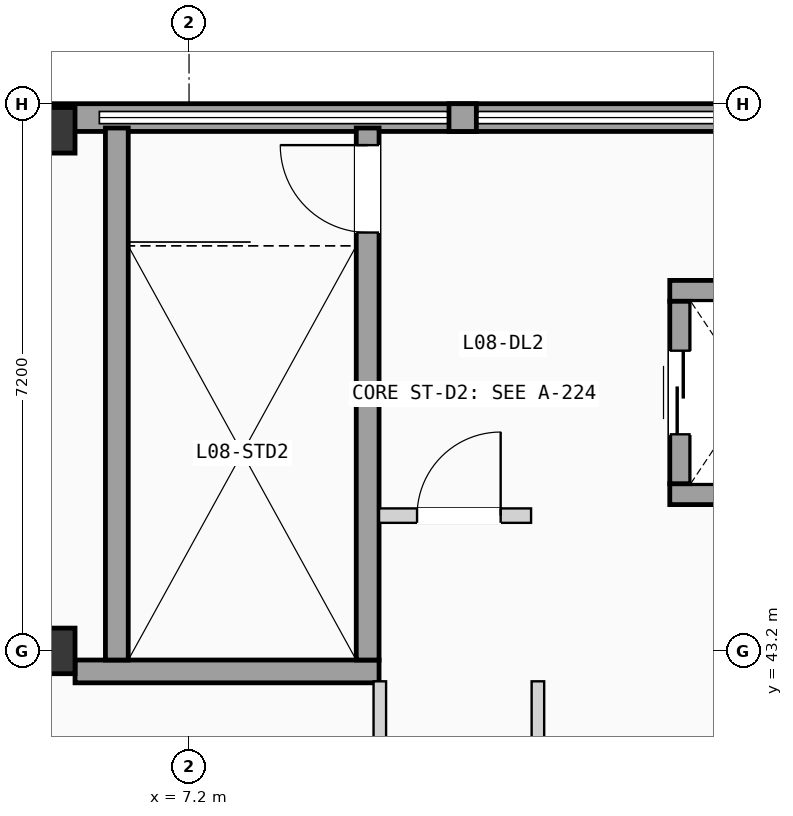
"""IFC4 building model, lengths in metres.
Left out: names, types, materials, properties, quantities, classifications, styles, units other than length and angle.
Written with IfcOpenShell. Run it as: python <this file> out.ifc"""

import sys

from ifc_helpers import new_model, si_unit, direction, frame, frame_2d, origin, origin_2d, place, context, subcontext, project, spatial, rectangle, extrude, element, fill, save


model = new_model("IFC4")
c1 = context("Model", 3, precision=1e-05, world=origin(), true_north=direction((0.0, 1.0)))
c2 = subcontext(c1, "Body", "Model", "MODEL_VIEW")
j1 = project(units=[si_unit("LENGTHUNIT", "METRE"), si_unit("PLANEANGLEUNIT", "RADIAN")], contexts=[c1])
p1 = place(None, origin())
s1 = spatial("IfcSite", under=j1, at=p1, CompositionType="ELEMENT")
p2 = place(p1, origin())
s2 = spatial("IfcBuilding", under=s1, at=p2, CompositionType="ELEMENT")
p3 = place(p2, frame((0.0, 0.0, 27.825)))
s3 = spatial("IfcBuildingStorey", under=s2, at=p3, CompositionType="ELEMENT", Elevation=27.825)
for number, where, z_axis, x_axis in (
    (1, (5.4, 43.2, 0.0), (0.0, 0.0, 1.0), (1.0, 0.0, 0.0)),
    (2, (5.4, 50.05, 0.0), (0.0, 0.0, 1.0), (1.0, 0.0, 0.0)),
):
    element("IfcColumn", number, at=place(p3, frame(where, z_axis=z_axis, x_axis=x_axis)), inside=s3, PredefinedType="COLUMN", context=c2, shape_type="SweptSolid", body=[
        extrude(rectangle(XDim=0.6, YDim=0.6, at=origin_2d()), origin(), (0.0, 0.0, 1.0), 2.85),
    ])
p4 = place(p3, frame((4.8, 50.218, 0.0), z_axis=(0.0, 0.0, 1.0), x_axis=(1.0, 0.0, 0.0)))
e3 = element("IfcWall", 3, at=p4, inside=s3, PredefinedType="SOLIDWALL", context=c2, shape_type="SweptSolid", body=[
    extrude(rectangle(XDim=12.0, YDim=0.365, at=frame_2d((6.0, 0.0))), origin(), (0.0, 0.0, 1.0), 1.11),
])
p5 = place(p3, frame((10.62, 50.218, 1.11), z_axis=(0.0, 0.0, 1.0), x_axis=(1.0, 0.0, 0.0)))
e4 = element("IfcWall", 4, at=p5, inside=s3, PredefinedType="SOLIDWALL", context=c2, shape_type="SweptSolid", body=[
    extrude(rectangle(XDim=0.36, YDim=0.365, at=frame_2d((0.18, 0.0))), origin(), (0.0, 0.0, 1.0), 1.44),
])
p6 = place(p3, frame((5.7, 42.93, 0.0), z_axis=(0.0, 0.0, 1.0), x_axis=(1.0, 0.0, 0.0)))
e5 = element("IfcWall", 5, at=p6, inside=s3, PredefinedType="SHEAR", context=c2, shape_type="SweptSolid", body=[
    extrude(rectangle(XDim=4.0, YDim=0.3, at=frame_2d((2.0, 0.0))), origin(), (0.0, 0.0, 1.0), 2.55),
])
p7 = place(p3, frame((6.25, 43.08, 0.0), z_axis=(0.0, 0.0, 1.0), x_axis=(0.0, 1.0, 0.0)))
e6 = element("IfcWall", 6, at=p7, inside=s3, PredefinedType="SHEAR", context=c2, shape_type="SweptSolid", body=[
    extrude(rectangle(XDim=7.0, YDim=0.3, at=frame_2d((3.5, 0.0))), origin(), (0.0, 0.0, 1.0), 2.55),
])
p8 = place(p3, frame((9.55, 43.08, 0.0), z_axis=(0.0, 0.0, 1.0), x_axis=(0.0, 1.0, 0.0)))
e7 = element("IfcWall", 7, at=p8, inside=s3, PredefinedType="SHEAR", context=c2, shape_type="SweptSolid", body=[
    extrude(rectangle(XDim=7.0, YDim=0.3, at=frame_2d((3.5, 0.0))), origin(), (0.0, 0.0, 1.0), 2.55),
])
p9 = place(p8, frame((5.625, 0.0, 0.0)))
e8 = element("IfcOpeningElement", 8, at=p9, cuts=e7, PredefinedType="OPENING", context=c2, shape_type="SweptSolid", body=[
    extrude(rectangle(XDim=1.15, YDim=2.12, at=frame_2d((0.575, 1.06))), frame((0.0, 0.16, 0.0), z_axis=(0.0, -1.0, 0.0), x_axis=(1.0, 0.0, 0.0)), (0.0, 0.0, 1.0), 0.32),
])
for number, where, z_axis, x_axis in (
    (9, (13.525, 45.262, 0.0), (0.0, 0.0, 1.0), (1.0, 0.0, 0.0)),
    (10, (13.525, 47.938, 0.0), (0.0, 0.0, 1.0), (1.0, 0.0, 0.0)),
):
    element("IfcWall", number, at=place(p3, frame(where, z_axis=z_axis, x_axis=x_axis)), inside=s3, PredefinedType="SHEAR", context=c2, shape_type="SweptSolid", body=[
        extrude(rectangle(XDim=2.15, YDim=0.275, at=frame_2d((1.075, 0.0))), origin(), (0.0, 0.0, 1.0), 2.55),
    ])
p10 = place(p3, frame((13.663, 45.4, 0.0), z_axis=(0.0, 0.0, 1.0), x_axis=(0.0, 1.0, 0.0)))
e11 = element("IfcWall", 11, at=p10, inside=s3, PredefinedType="SHEAR", context=c2, shape_type="SweptSolid", body=[
    extrude(rectangle(XDim=2.4, YDim=0.275, at=frame_2d((1.2, 0.0))), origin(), (0.0, 0.0, 1.0), 2.55),
])
p11 = place(p10, frame((0.65, 0.0, 0.0)))
e12 = element("IfcOpeningElement", 12, at=p11, cuts=e11, PredefinedType="OPENING", context=c2, shape_type="SweptSolid", body=[
    extrude(rectangle(XDim=1.1, YDim=2.15, at=frame_2d((0.55, 1.075))), frame((0.0, 0.147, 0.0), z_axis=(0.0, -1.0, 0.0), x_axis=(1.0, 0.0, 0.0)), (0.0, 0.0, 1.0), 0.295),
])
p12 = place(p3, frame((9.7, 44.98, 0.0), z_axis=(0.0, 0.0, 1.0), x_axis=(1.0, 0.0, 0.0)))
e13 = element("IfcWall", 13, at=p12, inside=s3, PredefinedType="PARTITIONING", context=c2, shape_type="SweptSolid", body=[
    extrude(rectangle(XDim=2.0, YDim=0.19, at=frame_2d((1.0, 0.0))), origin(), (0.0, 0.0, 1.0), 2.39),
])
p13 = place(p12, frame((0.5, 0.0, 0.0)))
e14 = element("IfcOpeningElement", 14, at=p13, cuts=e13, PredefinedType="OPENING", context=c2, shape_type="SweptSolid", body=[
    extrude(rectangle(XDim=1.1, YDim=2.12, at=frame_2d((0.55, 1.06))), frame((0.0, 0.105, 0.0), z_axis=(0.0, -1.0, 0.0), x_axis=(1.0, 0.0, 0.0)), (0.0, 0.0, 1.0), 0.21),
])
for number, where, z_axis, x_axis in (
    (15, (9.71, 39.03, 0.0), (0.0, 0.0, 1.0), (0.0, 1.0, 0.0)),
    (16, (11.79, 39.03, 0.0), (0.0, 0.0, 1.0), (0.0, 1.0, 0.0)),
):
    element("IfcWall", number, at=place(p3, frame(where, z_axis=z_axis, x_axis=x_axis)), inside=s3, PredefinedType="PARTITIONING", context=c2, shape_type="SweptSolid", body=[
        extrude(rectangle(XDim=3.77, YDim=0.165, at=frame_2d((1.885, 0.0))), origin(), (0.0, 0.0, 1.0), 2.39),
    ])
p14 = place(p9, origin())
e17 = element("IfcDoor", 17, at=p14, inside=s3, OperationType="SINGLE_SWING_RIGHT", PredefinedType="DOOR", context=c2, shape_type="SweptSolid", body=[
    extrude(rectangle(XDim=1.15, YDim=2.12, at=frame_2d((0.575, 1.06))), frame((0.0, 0.025, 0.0), z_axis=(0.0, -1.0, 0.0), x_axis=(1.0, 0.0, 0.0)), (0.0, 0.0, 1.0), 0.05),
])
fill(e8, e17)
p15 = place(p11, origin())
e18 = element("IfcDoor", 18, at=p15, inside=s3, OperationType="SLIDING_TO_LEFT", PredefinedType="DOOR", context=c2, shape_type="SweptSolid", body=[
    extrude(rectangle(XDim=1.1, YDim=2.15, at=frame_2d((0.55, 1.075))), frame((0.0, 0.025, 0.0), z_axis=(0.0, -1.0, 0.0), x_axis=(1.0, 0.0, 0.0)), (0.0, 0.0, 1.0), 0.05),
])
fill(e12, e18)
p16 = place(p13, origin())
e19 = element("IfcDoor", 19, at=p16, inside=s3, OperationType="SINGLE_SWING_RIGHT", PredefinedType="DOOR", context=c2, shape_type="SweptSolid", body=[
    extrude(rectangle(XDim=1.1, YDim=2.12, at=frame_2d((0.55, 1.06))), frame((0.0, 0.025, 0.0), z_axis=(0.0, -1.0, 0.0), x_axis=(1.0, 0.0, 0.0)), (0.0, 0.0, 1.0), 0.05),
])
fill(e14, e19)
save(model, sys.argv[1])
